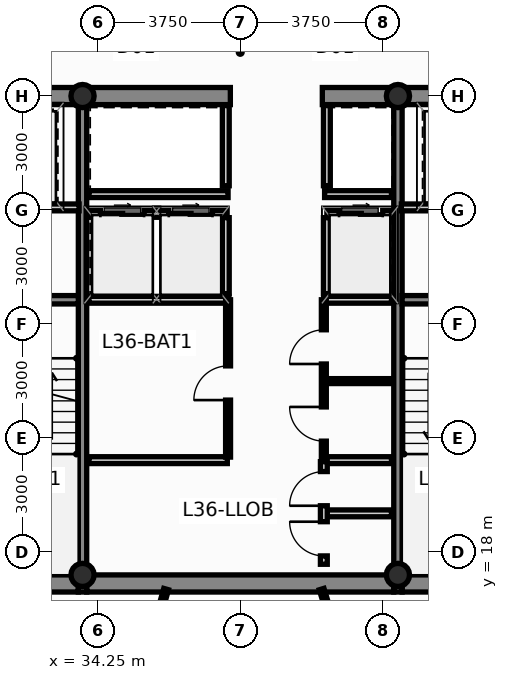
"""IFC4 building model, lengths in metres.
Left out: names, types, materials, properties, quantities, classifications, styles, units other than length and angle.
Written with IfcOpenShell. Run it as: python <this file> out.ifc"""

import sys

from ifc_helpers import new_model, si_unit, direction, frame, frame_2d, origin, origin_2d, place, context, subcontext, project, spatial, rectangle, hollow_circle, extrude, source, transform, mapped, element, fill, save


model = new_model("IFC4")
c1 = context("Model", 3, precision=1e-05, world=origin(), true_north=direction((0.0, 1.0)))
c2 = subcontext(c1, "Body", "Model", "MODEL_VIEW")
j1 = project(units=[si_unit("LENGTHUNIT", "METRE"), si_unit("PLANEANGLEUNIT", "RADIAN")], contexts=[c1])
p1 = place(None, origin())
s1 = spatial("IfcSite", under=j1, at=p1, CompositionType="ELEMENT")
p2 = place(p1, origin())
s2 = spatial("IfcBuilding", under=s1, at=p2, CompositionType="ELEMENT")
p3 = place(p2, frame((0.0, 0.0, 139.1)))
s3 = spatial("IfcBuildingStorey", under=s2, at=p3, CompositionType="ELEMENT", Elevation=139.1)
m1 = source(origin(), c2, "Body", "SweptSolid", [
    extrude(hollow_circle(Radius=0.305, WallThickness=0.025, at=origin_2d()), origin(), (0.0, 0.0, 1.0), 3.65),
])
for number, where, z_axis, x_axis in (
    (1, (33.85, 17.4, 0.0), (0.0, 0.0, 1.0), (1.0, 0.0, 0.0)),
    (2, (42.15, 17.4, 0.0), (0.0, 0.0, 1.0), (1.0, 0.0, 0.0)),
    (3, (33.85, 30.0, 0.0), (0.0, 0.0, 1.0), (1.0, 0.0, 0.0)),
    (4, (42.15, 30.0, 0.0), (0.0, 0.0, 1.0), (1.0, 0.0, 0.0)),
):
    element("IfcColumn", number, at=place(p3, frame(where, z_axis=z_axis, x_axis=x_axis)), inside=s3, PredefinedType="COLUMN", context=c2, shape_type="MappedRepresentation", body=[
        mapped(m1, transform((0.0, 0.0, 0.0), scale=1.0)),
    ])
p4 = place(p3, frame((30.84, 17.175, 0.0), z_axis=(0.0, 0.0, 1.0), x_axis=(1.0, 0.0, 0.0)))
e5 = element("IfcWall", 5, at=p4, inside=s3, PredefinedType="SHEAR", context=c2, shape_type="SweptSolid", body=[
    extrude(rectangle(XDim=2.9, YDim=0.45, at=frame_2d((1.45, 0.0))), origin(), (0.0, 0.0, 1.0), 3.65),
])
p5 = place(p3, frame((33.96, 17.175, 0.0), z_axis=(0.0, 0.0, 1.0), x_axis=(1.0, 0.0, 0.0)))
e6 = element("IfcWall", 6, at=p5, inside=s3, PredefinedType="SHEAR", context=c2, shape_type="SweptSolid", body=[
    extrude(rectangle(XDim=8.08, YDim=0.45, at=frame_2d((4.04, 0.0))), origin(), (0.0, 0.0, 1.0), 3.65),
])
for number, where, z_axis, x_axis in (
    (7, (42.26, 17.175, 0.0), (0.0, 0.0, 1.0), (1.0, 0.0, 0.0)),
    (8, (30.84, 30.0, 0.0), (0.0, 0.0, 1.0), (1.0, 0.0, 0.0)),
):
    element("IfcWall", number, at=place(p3, frame(where, z_axis=z_axis, x_axis=x_axis)), inside=s3, PredefinedType="SHEAR", context=c2, shape_type="SweptSolid", body=[
        extrude(rectangle(XDim=2.9, YDim=0.45, at=frame_2d((1.45, 0.0))), origin(), (0.0, 0.0, 1.0), 3.65),
    ])
p6 = place(p3, frame((33.96, 30.0, 0.0), z_axis=(0.0, 0.0, 1.0), x_axis=(1.0, 0.0, 0.0)))
e9 = element("IfcWall", 9, at=p6, inside=s3, PredefinedType="SHEAR", context=c2, shape_type="SweptSolid", body=[
    extrude(rectangle(XDim=3.78, YDim=0.45, at=frame_2d((1.89, 0.0))), origin(), (0.0, 0.0, 1.0), 3.65),
])
p7 = place(p3, frame((40.16, 30.0, 0.0), z_axis=(0.0, 0.0, 1.0), x_axis=(1.0, 0.0, 0.0)))
e10 = element("IfcWall", 10, at=p7, inside=s3, PredefinedType="SHEAR", context=c2, shape_type="SweptSolid", body=[
    extrude(rectangle(XDim=1.88, YDim=0.45, at=frame_2d((0.94, 0.0))), origin(), (0.0, 0.0, 1.0), 3.65),
])
p8 = place(p3, frame((42.26, 30.0, 0.0), z_axis=(0.0, 0.0, 1.0), x_axis=(1.0, 0.0, 0.0)))
e11 = element("IfcWall", 11, at=p8, inside=s3, PredefinedType="SHEAR", context=c2, shape_type="SweptSolid", body=[
    extrude(rectangle(XDim=2.9, YDim=0.45, at=frame_2d((1.45, 0.0))), origin(), (0.0, 0.0, 1.0), 3.65),
])
for number, where, z_axis, x_axis in (
    (12, (33.85, 16.95, 0.0), (0.0, 0.0, 1.0), (0.0, 1.0, 0.0)),
    (13, (42.15, 16.95, 0.0), (0.0, 0.0, 1.0), (0.0, 1.0, 0.0)),
):
    element("IfcWall", number, at=place(p3, frame(where, z_axis=z_axis, x_axis=x_axis)), inside=s3, PredefinedType="SHEAR", context=c2, shape_type="SweptSolid", body=[
        extrude(rectangle(XDim=13.275, YDim=0.22, at=frame_2d((6.638, 0.0))), origin(), (0.0, 0.0, 1.0), 3.65),
    ])
for number, where, z_axis, x_axis in (
    (14, (30.84, 24.64, 0.0), (0.0, 0.0, 1.0), (1.0, 0.0, 0.0)),
    (15, (42.26, 24.64, 0.0), (0.0, 0.0, 1.0), (1.0, 0.0, 0.0)),
):
    element("IfcWall", number, at=place(p3, frame(where, z_axis=z_axis, x_axis=x_axis)), inside=s3, PredefinedType="SHEAR", context=c2, shape_type="SweptSolid", body=[
        extrude(rectangle(XDim=2.9, YDim=0.22, at=frame_2d((1.45, 0.0))), origin(), (0.0, 0.0, 1.0), 3.65),
    ])
p9 = place(p3, frame((34.02, 26.9, 0.0), z_axis=(0.0, 0.0, 1.0), x_axis=(1.0, 0.0, 0.0)))
e16 = element("IfcWall", 16, at=p9, inside=s3, PredefinedType="PARTITIONING", context=c2, shape_type="SweptSolid", body=[
    extrude(rectangle(XDim=3.6, YDim=0.18, at=frame_2d((1.8, 0.0))), origin(), (0.0, 0.0, 1.0), 3.4),
])
p10 = place(p9, frame((0.3, 0.0, 0.0)))
e17 = element("IfcOpeningElement", 17, at=p10, cuts=e16, PredefinedType="OPENING", context=c2, shape_type="SweptSolid", body=[
    extrude(rectangle(XDim=1.15, YDim=2.2, at=frame_2d((0.575, 1.1))), frame((0.0, 0.102, 0.0), z_axis=(0.0, -1.0, 0.0), x_axis=(1.0, 0.0, 0.0)), (0.0, 0.0, 1.0), 0.204),
])
p11 = place(p9, frame((2.1, 0.0, 0.0)))
e18 = element("IfcOpeningElement", 18, at=p11, cuts=e16, PredefinedType="OPENING", context=c2, shape_type="SweptSolid", body=[
    extrude(rectangle(XDim=1.15, YDim=2.2, at=frame_2d((0.575, 1.1))), frame((0.0, 0.102, 0.0), z_axis=(0.0, -1.0, 0.0), x_axis=(1.0, 0.0, 0.0)), (0.0, 0.0, 1.0), 0.204),
])
p12 = place(p3, frame((40.28, 26.9, 0.0), z_axis=(0.0, 0.0, 1.0), x_axis=(1.0, 0.0, 0.0)))
e19 = element("IfcWall", 19, at=p12, inside=s3, PredefinedType="PARTITIONING", context=c2, shape_type="SweptSolid", body=[
    extrude(rectangle(XDim=1.7, YDim=0.18, at=frame_2d((0.85, 0.0))), origin(), (0.0, 0.0, 1.0), 3.4),
])
p13 = place(p12, frame((0.32, 0.0, 0.0)))
e20 = element("IfcOpeningElement", 20, at=p13, cuts=e19, PredefinedType="OPENING", context=c2, shape_type="SweptSolid", body=[
    extrude(rectangle(XDim=1.15, YDim=2.2, at=frame_2d((0.575, 1.1))), frame((0.0, 0.102, 0.0), z_axis=(0.0, -1.0, 0.0), x_axis=(1.0, 0.0, 0.0)), (0.0, 0.0, 1.0), 0.204),
])
for number, where, z_axis, x_axis in (
    (21, (37.62, 24.8, 0.0), (0.0, 0.0, 1.0), (0.0, 1.0, 0.0)),
    (22, (40.28, 24.8, 0.0), (0.0, 0.0, 1.0), (0.0, 1.0, 0.0)),
):
    element("IfcWall", number, at=place(p3, frame(where, z_axis=z_axis, x_axis=x_axis)), inside=s3, PredefinedType="PARTITIONING", context=c2, shape_type="SweptSolid", body=[
        extrude(rectangle(XDim=2.0, YDim=0.18, at=frame_2d((1.0, 0.0))), origin(), (0.0, 0.0, 1.0), 3.4),
    ])
p14 = place(p3, frame((34.02, 24.64, 0.0), z_axis=(0.0, 0.0, 1.0), x_axis=(1.0, 0.0, 0.0)))
e23 = element("IfcWall", 23, at=p14, inside=s3, PredefinedType="PARTITIONING", context=c2, shape_type="SweptSolid", body=[
    extrude(rectangle(XDim=3.68, YDim=0.18, at=frame_2d((1.84, 0.0))), origin(), (0.0, 0.0, 1.0), 3.4),
])
p15 = place(p3, frame((40.2, 24.64, 0.0), z_axis=(0.0, 0.0, 1.0), x_axis=(1.0, 0.0, 0.0)))
e24 = element("IfcWall", 24, at=p15, inside=s3, PredefinedType="PARTITIONING", context=c2, shape_type="SweptSolid", body=[
    extrude(rectangle(XDim=1.78, YDim=0.18, at=frame_2d((0.89, 0.0))), origin(), (0.0, 0.0, 1.0), 3.4),
])
p16 = place(p3, frame((34.02, 27.42, 0.0), z_axis=(0.0, 0.0, 1.0), x_axis=(1.0, 0.0, 0.0)))
e25 = element("IfcWall", 25, at=p16, inside=s3, PredefinedType="PARTITIONING", context=c2, shape_type="SweptSolid", body=[
    extrude(rectangle(XDim=3.66, YDim=0.18, at=frame_2d((1.83, 0.0))), origin(), (0.0, 0.0, 1.0), 3.4),
])
p17 = place(p3, frame((40.22, 27.42, 0.0), z_axis=(0.0, 0.0, 1.0), x_axis=(1.0, 0.0, 0.0)))
e26 = element("IfcWall", 26, at=p17, inside=s3, PredefinedType="PARTITIONING", context=c2, shape_type="SweptSolid", body=[
    extrude(rectangle(XDim=1.76, YDim=0.18, at=frame_2d((0.88, 0.0))), origin(), (0.0, 0.0, 1.0), 3.4),
])
for number, where, z_axis, x_axis in (
    (27, (37.62, 27.64, 0.0), (0.0, 0.0, 1.0), (0.0, 1.0, 0.0)),
    (28, (40.28, 27.64, 0.0), (0.0, 0.0, 1.0), (0.0, 1.0, 0.0)),
):
    element("IfcWall", number, at=place(p3, frame(where, z_axis=z_axis, x_axis=x_axis)), inside=s3, PredefinedType="PARTITIONING", context=c2, shape_type="SweptSolid", body=[
        extrude(rectangle(XDim=2.11, YDim=0.18, at=frame_2d((1.055, 0.0))), origin(), (0.0, 0.0, 1.0), 3.4),
    ])
for number, where, z_axis, x_axis in (
    (29, (30.86, 27.07, 0.0), (0.0, 0.0, 1.0), (1.0, 0.0, 0.0)),
    (30, (42.24, 27.07, 0.0), (0.0, 0.0, 1.0), (1.0, 0.0, 0.0)),
):
    element("IfcWall", number, at=place(p3, frame(where, z_axis=z_axis, x_axis=x_axis)), inside=s3, PredefinedType="PARTITIONING", context=c2, shape_type="SweptSolid", body=[
        extrude(rectangle(XDim=2.9, YDim=0.18, at=frame_2d((1.45, 0.0))), origin(), (0.0, 0.0, 1.0), 3.4),
    ])
p18 = place(p3, frame((34.02, 20.42, 0.0), z_axis=(0.0, 0.0, 1.0), x_axis=(1.0, 0.0, 0.0)))
e31 = element("IfcWall", 31, at=p18, inside=s3, PredefinedType="PARTITIONING", context=c2, shape_type="SweptSolid", body=[
    extrude(rectangle(XDim=3.64, YDim=0.18, at=frame_2d((1.82, 0.0))), origin(), (0.0, 0.0, 1.0), 3.4),
])
p19 = place(p3, frame((40.22, 20.42, 0.0), z_axis=(0.0, 0.0, 1.0), x_axis=(1.0, 0.0, 0.0)))
e32 = element("IfcWall", 32, at=p19, inside=s3, PredefinedType="PARTITIONING", context=c2, shape_type="SweptSolid", body=[
    extrude(rectangle(XDim=1.76, YDim=0.18, at=frame_2d((0.88, 0.0))), origin(), (0.0, 0.0, 1.0), 3.4),
])
p20 = place(p3, frame((40.28, 22.5, 0.0), z_axis=(0.0, 0.0, 1.0), x_axis=(1.0, 0.0, 0.0)))
e33 = element("IfcWall", 33, at=p20, inside=s3, PredefinedType="PARTITIONING", context=c2, shape_type="SweptSolid", body=[
    extrude(rectangle(XDim=1.7, YDim=0.13, at=frame_2d((0.85, 0.0))), origin(), (0.0, 0.0, 1.0), 3.4),
])
p21 = place(p3, frame((37.68, 20.5, 0.0), z_axis=(0.0, 0.0, 1.0), x_axis=(0.0, 1.0, 0.0)))
e34 = element("IfcWall", 34, at=p21, inside=s3, PredefinedType="PARTITIONING", context=c2, shape_type="SweptSolid", body=[
    extrude(rectangle(XDim=4.14, YDim=0.13, at=frame_2d((2.07, 0.0))), origin(), (0.0, 0.0, 1.0), 3.4),
])
p22 = place(p21, frame((1.5, 0.0, 0.0)))
e35 = element("IfcOpeningElement", 35, at=p22, cuts=e34, PredefinedType="OPENING", context=c2, shape_type="SweptSolid", body=[
    extrude(rectangle(XDim=0.9, YDim=2.1, at=frame_2d((0.45, 1.05))), frame((0.0, 0.077, 0.0), z_axis=(0.0, -1.0, 0.0), x_axis=(1.0, 0.0, 0.0)), (0.0, 0.0, 1.0), 0.154),
])
p23 = place(p3, frame((40.2, 20.5, 0.0), z_axis=(0.0, 0.0, 1.0), x_axis=(0.0, 1.0, 0.0)))
e36 = element("IfcWall", 36, at=p23, inside=s3, PredefinedType="PARTITIONING", context=c2, shape_type="SweptSolid", body=[
    extrude(rectangle(XDim=4.14, YDim=0.13, at=frame_2d((2.07, 0.0))), origin(), (0.0, 0.0, 1.0), 3.4),
])
p24 = place(p23, frame((0.42, 0.0, 0.0)))
e37 = element("IfcOpeningElement", 37, at=p24, cuts=e36, PredefinedType="OPENING", context=c2, shape_type="SweptSolid", body=[
    extrude(rectangle(XDim=0.9, YDim=2.1, at=frame_2d((0.45, 1.05))), frame((0.0, 0.077, 0.0), z_axis=(0.0, -1.0, 0.0), x_axis=(1.0, 0.0, 0.0)), (0.0, 0.0, 1.0), 0.154),
])
p25 = place(p23, frame((2.45, 0.0, 0.0)))
e38 = element("IfcOpeningElement", 38, at=p25, cuts=e36, PredefinedType="OPENING", context=c2, shape_type="SweptSolid", body=[
    extrude(rectangle(XDim=0.9, YDim=2.1, at=frame_2d((0.45, 1.05))), frame((0.0, 0.077, 0.0), z_axis=(0.0, -1.0, 0.0), x_axis=(1.0, 0.0, 0.0)), (0.0, 0.0, 1.0), 0.154),
])
p26 = place(p3, frame((40.28, 19.02, 0.0), z_axis=(0.0, 0.0, 1.0), x_axis=(1.0, 0.0, 0.0)))
e39 = element("IfcWall", 39, at=p26, inside=s3, PredefinedType="PARTITIONING", context=c2, shape_type="SweptSolid", body=[
    extrude(rectangle(XDim=1.7, YDim=0.18, at=frame_2d((0.85, 0.0))), origin(), (0.0, 0.0, 1.0), 3.4),
])
p27 = place(p3, frame((40.2, 17.68, 0.0), z_axis=(0.0, 0.0, 1.0), x_axis=(0.0, 1.0, 0.0)))
e40 = element("IfcWall", 40, at=p27, inside=s3, PredefinedType="PARTITIONING", context=c2, shape_type="SweptSolid", body=[
    extrude(rectangle(XDim=2.7, YDim=0.18, at=frame_2d((1.35, 0.0))), origin(), (0.0, 0.0, 1.0), 3.4),
])
p28 = place(p27, frame((0.22, 0.0, 0.0)))
e41 = element("IfcOpeningElement", 41, at=p28, cuts=e40, PredefinedType="OPENING", context=c2, shape_type="SweptSolid", body=[
    extrude(rectangle(XDim=0.9, YDim=2.1, at=frame_2d((0.45, 1.05))), frame((0.0, 0.102, 0.0), z_axis=(0.0, -1.0, 0.0), x_axis=(1.0, 0.0, 0.0)), (0.0, 0.0, 1.0), 0.204),
])
p29 = place(p27, frame((1.54, 0.0, 0.0)))
e42 = element("IfcOpeningElement", 42, at=p29, cuts=e40, PredefinedType="OPENING", context=c2, shape_type="SweptSolid", body=[
    extrude(rectangle(XDim=0.9, YDim=2.1, at=frame_2d((0.45, 1.05))), frame((0.0, 0.102, 0.0), z_axis=(0.0, -1.0, 0.0), x_axis=(1.0, 0.0, 0.0)), (0.0, 0.0, 1.0), 0.204),
])
p30 = place(p3, frame((40.142, 17.028, 0.0), z_axis=(0.0, 0.0, 1.0), x_axis=(0.293908154099, -0.955833665945, 0.0)))
e43 = element("IfcWall", 43, at=p30, inside=s3, PredefinedType="PARTITIONING", context=c2, shape_type="SweptSolid", body=[
    extrude(rectangle(XDim=11.296, YDim=0.13, at=frame_2d((5.648, 0.0))), origin(), (0.0, 0.0, 1.0), 3.4),
])
p31 = place(p30, frame((5.216, 0.0, 0.0)))
e44 = element("IfcOpeningElement", 44, at=p31, cuts=e43, PredefinedType="OPENING", context=c2, shape_type="SweptSolid", body=[
    extrude(rectangle(XDim=0.96, YDim=2.15, at=frame_2d((0.48, 1.075))), frame((0.0, 0.077, 0.0), z_axis=(0.0, -1.0, 0.0), x_axis=(1.0, 0.0, 0.0)), (0.0, 0.0, 1.0), 0.154),
])
p32 = place(p3, frame((33.047, 6.316, 0.0), z_axis=(0.0, 0.0, 1.0), x_axis=(0.269944107311, 0.962875993536, 0.0)))
e45 = element("IfcWall", 45, at=p32, inside=s3, PredefinedType="PARTITIONING", context=c2, shape_type="SweptSolid", body=[
    extrude(rectangle(XDim=11.125, YDim=0.13, at=frame_2d((5.562, 0.0))), origin(), (0.0, 0.0, 1.0), 3.4),
])
p33 = place(p32, frame((5.132, 0.0, 0.0)))
e46 = element("IfcOpeningElement", 46, at=p33, cuts=e45, PredefinedType="OPENING", context=c2, shape_type="SweptSolid", body=[
    extrude(rectangle(XDim=0.96, YDim=2.15, at=frame_2d((0.48, 1.075))), frame((0.0, 0.077, 0.0), z_axis=(0.0, -1.0, 0.0), x_axis=(1.0, 0.0, 0.0)), (0.0, 0.0, 1.0), 0.154),
])
p34 = place(p10, origin())
e47 = element("IfcDoor", 47, at=p34, inside=s3, OperationType="SLIDING_TO_LEFT", PredefinedType="DOOR", context=c2, shape_type="SweptSolid", body=[
    extrude(rectangle(XDim=1.15, YDim=2.2, at=frame_2d((0.575, 1.1))), frame((0.0, 0.025, 0.0), z_axis=(0.0, -1.0, 0.0), x_axis=(1.0, 0.0, 0.0)), (0.0, 0.0, 1.0), 0.05),
])
fill(e17, e47)
p35 = place(p11, origin())
e48 = element("IfcDoor", 48, at=p35, inside=s3, OperationType="SLIDING_TO_RIGHT", PredefinedType="DOOR", context=c2, shape_type="SweptSolid", body=[
    extrude(rectangle(XDim=1.15, YDim=2.2, at=frame_2d((0.575, 1.1))), frame((0.0, 0.025, 0.0), z_axis=(0.0, -1.0, 0.0), x_axis=(1.0, 0.0, 0.0)), (0.0, 0.0, 1.0), 0.05),
])
fill(e18, e48)
p36 = place(p13, origin())
e49 = element("IfcDoor", 49, at=p36, inside=s3, OperationType="SLIDING_TO_LEFT", PredefinedType="DOOR", context=c2, shape_type="SweptSolid", body=[
    extrude(rectangle(XDim=1.15, YDim=2.2, at=frame_2d((0.575, 1.1))), frame((0.0, 0.025, 0.0), z_axis=(0.0, -1.0, 0.0), x_axis=(1.0, 0.0, 0.0)), (0.0, 0.0, 1.0), 0.05),
])
fill(e20, e49)
p37 = place(p22, origin())
e50 = element("IfcDoor", 50, at=p37, inside=s3, OperationType="SINGLE_SWING_LEFT", PredefinedType="DOOR", context=c2, shape_type="SweptSolid", body=[
    extrude(rectangle(XDim=0.9, YDim=2.1, at=frame_2d((0.45, 1.05))), frame((0.0, 0.025, 0.0), z_axis=(0.0, -1.0, 0.0), x_axis=(1.0, 0.0, 0.0)), (0.0, 0.0, 1.0), 0.05),
])
fill(e35, e50)
p38 = place(p24, origin())
e51 = element("IfcDoor", 51, at=p38, inside=s3, OperationType="SINGLE_SWING_RIGHT", PredefinedType="DOOR", context=c2, shape_type="SweptSolid", body=[
    extrude(rectangle(XDim=0.9, YDim=2.1, at=frame_2d((0.45, 1.05))), frame((0.0, 0.025, 0.0), z_axis=(0.0, -1.0, 0.0), x_axis=(1.0, 0.0, 0.0)), (0.0, 0.0, 1.0), 0.05),
])
fill(e37, e51)
p39 = place(p25, origin())
e52 = element("IfcDoor", 52, at=p39, inside=s3, OperationType="SINGLE_SWING_LEFT", PredefinedType="DOOR", context=c2, shape_type="SweptSolid", body=[
    extrude(rectangle(XDim=0.9, YDim=2.1, at=frame_2d((0.45, 1.05))), frame((0.0, 0.025, 0.0), z_axis=(0.0, -1.0, 0.0), x_axis=(1.0, 0.0, 0.0)), (0.0, 0.0, 1.0), 0.05),
])
fill(e38, e52)
p40 = place(p28, origin())
e53 = element("IfcDoor", 53, at=p40, inside=s3, OperationType="SINGLE_SWING_RIGHT", PredefinedType="DOOR", context=c2, shape_type="SweptSolid", body=[
    extrude(rectangle(XDim=0.9, YDim=2.1, at=frame_2d((0.45, 1.05))), frame((0.0, 0.025, 0.0), z_axis=(0.0, -1.0, 0.0), x_axis=(1.0, 0.0, 0.0)), (0.0, 0.0, 1.0), 0.05),
])
fill(e41, e53)
p41 = place(p29, origin())
e54 = element("IfcDoor", 54, at=p41, inside=s3, OperationType="SINGLE_SWING_LEFT", PredefinedType="DOOR", context=c2, shape_type="SweptSolid", body=[
    extrude(rectangle(XDim=0.9, YDim=2.1, at=frame_2d((0.45, 1.05))), frame((0.0, 0.025, 0.0), z_axis=(0.0, -1.0, 0.0), x_axis=(1.0, 0.0, 0.0)), (0.0, 0.0, 1.0), 0.05),
])
fill(e42, e54)
save(model, sys.argv[1])
